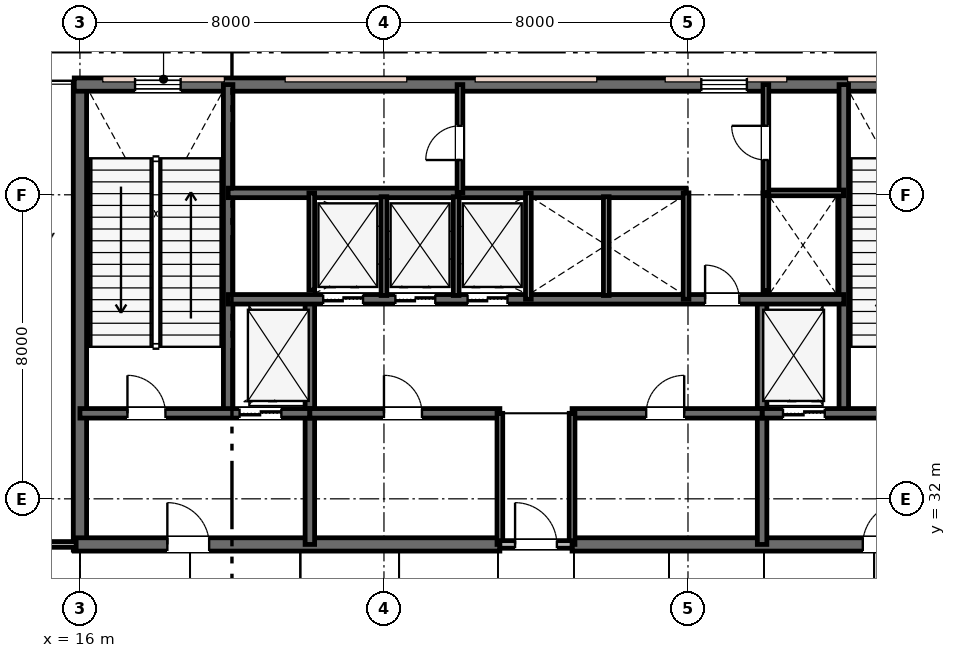
"""IFC4 building model, lengths in metres.
Left out: names, types, materials, properties, quantities, classifications, styles, units other than length and angle.
Written with IfcOpenShell. Run it as: python <this file> out.ifc"""

import sys

from ifc_helpers import new_model, si_unit, direction, frame, frame_2d, origin, place, context, subcontext, project, spatial, rectangle, extrude, element, fill, save


model = new_model("IFC4")
c1 = context("Model", 3, precision=1e-05, world=origin(), true_north=direction((0.0, 1.0)))
c2 = subcontext(c1, "Body", "Model", "MODEL_VIEW")
j1 = project(units=[si_unit("LENGTHUNIT", "METRE"), si_unit("PLANEANGLEUNIT", "RADIAN")], contexts=[c1])
p1 = place(None, origin())
s1 = spatial("IfcSite", under=j1, at=p1, CompositionType="ELEMENT")
p2 = place(p1, origin())
s2 = spatial("IfcBuilding", under=s1, at=p2, CompositionType="ELEMENT")
p3 = place(p2, frame((0.0, 0.0, 213.0)))
s3 = spatial("IfcBuildingStorey", under=s2, at=p3, CompositionType="ELEMENT", Elevation=213.0)
p4 = place(p3, frame((16.0, 30.65, 0.0), z_axis=(0.0, 0.0, 1.0), x_axis=(0.0, 1.0, 0.0)))
e1 = element("IfcWall", 1, at=p4, inside=s3, PredefinedType="SHEAR", context=c2, shape_type="SweptSolid", body=[
    extrude(rectangle(XDim=12.3, YDim=0.35, at=frame_2d((6.15, 0.0))), origin(), (0.0, 0.0, 1.0), 5.4),
])
p5 = place(p3, frame((15.85, 42.9, 0.0), z_axis=(0.0, 0.0, 1.0), x_axis=(1.0, 0.0, 0.0)))
e2 = element("IfcWall", 2, at=p5, inside=s3, PredefinedType="SHEAR", context=c2, shape_type="SweptSolid", body=[
    extrude(rectangle(XDim=24.3, YDim=0.35, at=frame_2d((12.15, 0.0))), origin(), (0.0, 0.0, 1.0), 5.4),
])
p6 = place(p5, frame((1.6, 0.0, 0.95)))
e3 = element("IfcOpeningElement", 3, at=p6, cuts=e2, PredefinedType="OPENING", context=c2, shape_type="SweptSolid", body=[
    extrude(rectangle(XDim=1.2, YDim=1.6, at=frame_2d((0.6, 0.8))), frame((0.0, 0.185, 0.0), z_axis=(0.0, -1.0, 0.0), x_axis=(1.0, 0.0, 0.0)), (0.0, 0.0, 1.0), 0.37),
])
p7 = place(p5, frame((16.5, 0.0, 0.95)))
e4 = element("IfcOpeningElement", 4, at=p7, cuts=e2, PredefinedType="OPENING", context=c2, shape_type="SweptSolid", body=[
    extrude(rectangle(XDim=1.2, YDim=1.6, at=frame_2d((0.6, 0.8))), frame((0.0, 0.185, 0.0), z_axis=(0.0, -1.0, 0.0), x_axis=(1.0, 0.0, 0.0)), (0.0, 0.0, 1.0), 0.37),
])
p8 = place(p5, frame((21.6, 0.0, 0.95)))
e5 = element("IfcOpeningElement", 5, at=p8, cuts=e2, PredefinedType="OPENING", context=c2, shape_type="SweptSolid", body=[
    extrude(rectangle(XDim=1.2, YDim=1.6, at=frame_2d((0.6, 0.8))), frame((0.0, 0.185, 0.0), z_axis=(0.0, -1.0, 0.0), x_axis=(1.0, 0.0, 0.0)), (0.0, 0.0, 1.0), 0.37),
])
p9 = place(p3, frame((15.85, 30.8, 0.0), z_axis=(0.0, 0.0, 1.0), x_axis=(1.0, 0.0, 0.0)))
e6 = element("IfcWall", 6, at=p9, inside=s3, PredefinedType="SHEAR", context=c2, shape_type="SweptSolid", body=[
    extrude(rectangle(XDim=11.2, YDim=0.35, at=frame_2d((5.6, 0.0))), origin(), (0.0, 0.0, 1.0), 5.4),
])
p10 = place(p9, frame((2.45, 0.0, 0.0)))
e7 = element("IfcOpeningElement", 7, at=p10, cuts=e6, PredefinedType="OPENING", context=c2, shape_type="SweptSolid", body=[
    extrude(rectangle(XDim=1.1, YDim=2.15, at=frame_2d((0.55, 1.075))), frame((0.0, 0.185, 0.0), z_axis=(0.0, -1.0, 0.0), x_axis=(1.0, 0.0, 0.0)), (0.0, 0.0, 1.0), 0.37),
])
p11 = place(p3, frame((28.95, 30.8, 0.0), z_axis=(0.0, 0.0, 1.0), x_axis=(1.0, 0.0, 0.0)))
e8 = element("IfcWall", 8, at=p11, inside=s3, PredefinedType="SHEAR", context=c2, shape_type="SweptSolid", body=[
    extrude(rectangle(XDim=11.2, YDim=0.35, at=frame_2d((5.6, 0.0))), origin(), (0.0, 0.0, 1.0), 5.4),
])
p12 = place(p11, frame((7.65, 0.0, 0.0)))
e9 = element("IfcOpeningElement", 9, at=p12, cuts=e8, PredefinedType="OPENING", context=c2, shape_type="SweptSolid", body=[
    extrude(rectangle(XDim=1.1, YDim=2.15, at=frame_2d((0.55, 1.075))), frame((0.0, 0.185, 0.0), z_axis=(0.0, -1.0, 0.0), x_axis=(1.0, 0.0, 0.0)), (0.0, 0.0, 1.0), 0.37),
])
for number, where, z_axis, x_axis in (
    (10, (19.9, 34.25, 0.0), (0.0, 0.0, 1.0), (0.0, 1.0, 0.0)),
    (11, (36.1, 34.25, 0.0), (0.0, 0.0, 1.0), (0.0, 1.0, 0.0)),
):
    element("IfcWall", number, at=place(p3, frame(where, z_axis=z_axis, x_axis=x_axis)), inside=s3, PredefinedType="SHEAR", context=c2, shape_type="SweptSolid", body=[
        extrude(rectangle(XDim=8.65, YDim=0.25, at=frame_2d((4.325, 0.0))), origin(), (0.0, 0.0, 1.0), 5.4),
    ])
for number, where, z_axis, x_axis in (
    (12, (22.05, 30.8, 0.0), (0.0, 0.0, 1.0), (0.0, 1.0, 0.0)),
    (13, (33.95, 30.8, 0.0), (0.0, 0.0, 1.0), (0.0, 1.0, 0.0)),
):
    element("IfcWall", number, at=place(p3, frame(where, z_axis=z_axis, x_axis=x_axis)), inside=s3, PredefinedType="SHEAR", context=c2, shape_type="SweptSolid", body=[
        extrude(rectangle(XDim=6.45, YDim=0.25, at=frame_2d((3.225, 0.0))), origin(), (0.0, 0.0, 1.0), 5.4),
    ])
p13 = place(p3, frame((16.0, 34.25, 0.0), z_axis=(0.0, 0.0, 1.0), x_axis=(1.0, 0.0, 0.0)))
e14 = element("IfcWall", 14, at=p13, inside=s3, PredefinedType="SHEAR", context=c2, shape_type="SweptSolid", body=[
    extrude(rectangle(XDim=6.05, YDim=0.25, at=frame_2d((3.025, 0.0))), origin(), (0.0, 0.0, 1.0), 5.4),
])
p14 = place(p13, frame((1.25, 0.0, 0.0)))
e15 = element("IfcOpeningElement", 15, at=p14, cuts=e14, PredefinedType="OPENING", context=c2, shape_type="SweptSolid", body=[
    extrude(rectangle(XDim=1.0, YDim=2.15, at=frame_2d((0.5, 1.075))), frame((0.0, 0.135, 0.0), z_axis=(0.0, -1.0, 0.0), x_axis=(1.0, 0.0, 0.0)), (0.0, 0.0, 1.0), 0.27),
])
p15 = place(p13, frame((4.2, 0.0, 0.0)))
e16 = element("IfcOpeningElement", 16, at=p15, cuts=e14, PredefinedType="OPENING", context=c2, shape_type="SweptSolid", body=[
    extrude(rectangle(XDim=1.1, YDim=2.15, at=frame_2d((0.55, 1.075))), frame((0.0, 0.135, 0.0), z_axis=(0.0, -1.0, 0.0), x_axis=(1.0, 0.0, 0.0)), (0.0, 0.0, 1.0), 0.27),
])
p16 = place(p3, frame((33.95, 34.25, 0.0), z_axis=(0.0, 0.0, 1.0), x_axis=(1.0, 0.0, 0.0)))
e17 = element("IfcWall", 17, at=p16, inside=s3, PredefinedType="SHEAR", context=c2, shape_type="SweptSolid", body=[
    extrude(rectangle(XDim=6.05, YDim=0.25, at=frame_2d((3.025, 0.0))), origin(), (0.0, 0.0, 1.0), 5.4),
])
p17 = place(p16, frame((3.7, 0.0, 0.0)))
e18 = element("IfcOpeningElement", 18, at=p17, cuts=e17, PredefinedType="OPENING", context=c2, shape_type="SweptSolid", body=[
    extrude(rectangle(XDim=1.0, YDim=2.15, at=frame_2d((0.5, 1.075))), frame((0.0, 0.135, 0.0), z_axis=(0.0, -1.0, 0.0), x_axis=(1.0, 0.0, 0.0)), (0.0, 0.0, 1.0), 0.27),
])
p18 = place(p16, frame((0.55, 0.0, 0.0)))
e19 = element("IfcOpeningElement", 19, at=p18, cuts=e17, PredefinedType="OPENING", context=c2, shape_type="SweptSolid", body=[
    extrude(rectangle(XDim=1.1, YDim=2.15, at=frame_2d((0.55, 1.075))), frame((0.0, 0.135, 0.0), z_axis=(0.0, -1.0, 0.0), x_axis=(1.0, 0.0, 0.0)), (0.0, 0.0, 1.0), 0.27),
])
p19 = place(p3, frame((22.05, 34.25, 0.0), z_axis=(0.0, 0.0, 1.0), x_axis=(1.0, 0.0, 0.0)))
e20 = element("IfcWall", 20, at=p19, inside=s3, PredefinedType="SHEAR", context=c2, shape_type="SweptSolid", body=[
    extrude(rectangle(XDim=5.0, YDim=0.25, at=frame_2d((2.5, 0.0))), origin(), (0.0, 0.0, 1.0), 5.4),
])
p20 = place(p19, frame((1.95, 0.0, 0.0)))
e21 = element("IfcOpeningElement", 21, at=p20, cuts=e20, PredefinedType="OPENING", context=c2, shape_type="SweptSolid", body=[
    extrude(rectangle(XDim=1.0, YDim=2.15, at=frame_2d((0.5, 1.075))), frame((0.0, 0.135, 0.0), z_axis=(0.0, -1.0, 0.0), x_axis=(1.0, 0.0, 0.0)), (0.0, 0.0, 1.0), 0.27),
])
p21 = place(p3, frame((28.95, 34.25, 0.0), z_axis=(0.0, 0.0, 1.0), x_axis=(1.0, 0.0, 0.0)))
e22 = element("IfcWall", 22, at=p21, inside=s3, PredefinedType="SHEAR", context=c2, shape_type="SweptSolid", body=[
    extrude(rectangle(XDim=5.0, YDim=0.25, at=frame_2d((2.5, 0.0))), origin(), (0.0, 0.0, 1.0), 5.4),
])
p22 = place(p21, frame((1.95, 0.0, 0.0)))
e23 = element("IfcOpeningElement", 23, at=p22, cuts=e22, PredefinedType="OPENING", context=c2, shape_type="SweptSolid", body=[
    extrude(rectangle(XDim=1.0, YDim=2.15, at=frame_2d((0.5, 1.075))), frame((0.0, 0.135, 0.0), z_axis=(0.0, -1.0, 0.0), x_axis=(1.0, 0.0, 0.0)), (0.0, 0.0, 1.0), 0.27),
])
p23 = place(p3, frame((19.9, 37.25, 0.0), z_axis=(0.0, 0.0, 1.0), x_axis=(1.0, 0.0, 0.0)))
e24 = element("IfcWall", 24, at=p23, inside=s3, PredefinedType="SHEAR", context=c2, shape_type="SweptSolid", body=[
    extrude(rectangle(XDim=16.2, YDim=0.25, at=frame_2d((8.1, 0.0))), origin(), (0.0, 0.0, 1.0), 5.4),
])
p24 = place(p23, frame((12.55, 0.0, 0.0)))
e25 = element("IfcOpeningElement", 25, at=p24, cuts=e24, PredefinedType="OPENING", context=c2, shape_type="SweptSolid", body=[
    extrude(rectangle(XDim=0.9, YDim=2.15, at=frame_2d((0.45, 1.075))), frame((0.0, 0.135, 0.0), z_axis=(0.0, -1.0, 0.0), x_axis=(1.0, 0.0, 0.0)), (0.0, 0.0, 1.0), 0.27),
])
p25 = place(p23, frame((2.5, 0.0, 0.0)))
e26 = element("IfcOpeningElement", 26, at=p25, cuts=e24, PredefinedType="OPENING", context=c2, shape_type="SweptSolid", body=[
    extrude(rectangle(XDim=1.05, YDim=2.15, at=frame_2d((0.525, 1.075))), frame((0.0, 0.135, 0.0), z_axis=(0.0, -1.0, 0.0), x_axis=(1.0, 0.0, 0.0)), (0.0, 0.0, 1.0), 0.27),
])
p26 = place(p23, frame((4.4, 0.0, 0.0)))
e27 = element("IfcOpeningElement", 27, at=p26, cuts=e24, PredefinedType="OPENING", context=c2, shape_type="SweptSolid", body=[
    extrude(rectangle(XDim=1.05, YDim=2.15, at=frame_2d((0.525, 1.075))), frame((0.0, 0.135, 0.0), z_axis=(0.0, -1.0, 0.0), x_axis=(1.0, 0.0, 0.0)), (0.0, 0.0, 1.0), 0.27),
])
p27 = place(p23, frame((6.3, 0.0, 0.0)))
e28 = element("IfcOpeningElement", 28, at=p27, cuts=e24, PredefinedType="OPENING", context=c2, shape_type="SweptSolid", body=[
    extrude(rectangle(XDim=1.05, YDim=2.15, at=frame_2d((0.525, 1.075))), frame((0.0, 0.135, 0.0), z_axis=(0.0, -1.0, 0.0), x_axis=(1.0, 0.0, 0.0)), (0.0, 0.0, 1.0), 0.27),
])
p28 = place(p3, frame((19.9, 40.05, 0.0), z_axis=(0.0, 0.0, 1.0), x_axis=(1.0, 0.0, 0.0)))
e29 = element("IfcWall", 29, at=p28, inside=s3, PredefinedType="SHEAR", context=c2, shape_type="SweptSolid", body=[
    extrude(rectangle(XDim=12.05, YDim=0.25, at=frame_2d((6.025, 0.0))), origin(), (0.0, 0.0, 1.0), 5.4),
])
for number, where, z_axis, x_axis in (
    (30, (27.05, 30.8, 0.0), (0.0, 0.0, 1.0), (0.0, 1.0, 0.0)),
    (31, (28.95, 30.8, 0.0), (0.0, 0.0, 1.0), (0.0, 1.0, 0.0)),
):
    element("IfcWall", number, at=place(p3, frame(where, z_axis=z_axis, x_axis=x_axis)), inside=s3, PredefinedType="PLUMBINGWALL", context=c2, shape_type="SweptSolid", body=[
        extrude(rectangle(XDim=3.45, YDim=0.15, at=frame_2d((1.725, 0.0))), origin(), (0.0, 0.0, 1.0), 4.82),
    ])
p29 = place(p3, frame((27.05, 30.8, 0.0), z_axis=(0.0, 0.0, 1.0), x_axis=(1.0, 0.0, 0.0)))
e32 = element("IfcWall", 32, at=p29, inside=s3, PredefinedType="PARTITIONING", context=c2, shape_type="SweptSolid", body=[
    extrude(rectangle(XDim=1.9, YDim=0.2, at=frame_2d((0.95, 0.0))), origin(), (0.0, 0.0, 1.0), 4.82),
])
p30 = place(p29, frame((0.4, 0.0, 0.0)))
e33 = element("IfcOpeningElement", 33, at=p30, cuts=e32, PredefinedType="OPENING", context=c2, shape_type="SweptSolid", body=[
    extrude(rectangle(XDim=1.1, YDim=2.15, at=frame_2d((0.55, 1.075))), frame((0.0, 0.11, 0.0), z_axis=(0.0, -1.0, 0.0), x_axis=(1.0, 0.0, 0.0)), (0.0, 0.0, 1.0), 0.22),
])
p31 = place(p3, frame((22.1, 37.49, 0.0), z_axis=(0.0, 0.0, 1.0), x_axis=(0.0, 1.0, 0.0)))
e34 = element("IfcWall", 34, at=p31, inside=s3, PredefinedType="PLUMBINGWALL", context=c2, shape_type="SweptSolid", body=[
    extrude(rectangle(XDim=2.56, YDim=0.15, at=frame_2d((1.28, 0.0))), origin(), (0.0, 0.0, 1.0), 5.13),
])
p32 = place(p3, frame((27.8, 37.25, 0.0), z_axis=(0.0, 0.0, 1.0), x_axis=(0.0, 1.0, 0.0)))
e35 = element("IfcWall", 35, at=p32, inside=s3, PredefinedType="PLUMBINGWALL", context=c2, shape_type="SweptSolid", body=[
    extrude(rectangle(XDim=2.8, YDim=0.15, at=frame_2d((1.4, 0.0))), origin(), (0.0, 0.0, 1.0), 5.13),
])
for number, where, z_axis, x_axis in (
    (36, (24.0, 37.35, 0.0), (0.0, 0.0, 1.0), (0.0, 1.0, 0.0)),
    (37, (25.9, 37.35, 0.0), (0.0, 0.0, 1.0), (0.0, 1.0, 0.0)),
):
    element("IfcWall", number, at=place(p3, frame(where, z_axis=z_axis, x_axis=x_axis)), inside=s3, PredefinedType="PLUMBINGWALL", context=c2, shape_type="SweptSolid", body=[
        extrude(rectangle(XDim=2.6, YDim=0.15, at=frame_2d((1.3, 0.0))), origin(), (0.0, 0.0, 1.0), 5.13),
    ])
p33 = place(p3, frame((31.95, 37.25, 0.0), z_axis=(0.0, 0.0, 1.0), x_axis=(0.0, 1.0, 0.0)))
e38 = element("IfcWall", 38, at=p33, inside=s3, PredefinedType="PLUMBINGWALL", context=c2, shape_type="SweptSolid", body=[
    extrude(rectangle(XDim=2.8, YDim=0.15, at=frame_2d((1.4, 0.0))), origin(), (0.0, 0.0, 1.0), 5.13),
])
p34 = place(p3, frame((29.85, 37.35, 0.0), z_axis=(0.0, 0.0, 1.0), x_axis=(0.0, 1.0, 0.0)))
e39 = element("IfcWall", 39, at=p34, inside=s3, PredefinedType="PLUMBINGWALL", context=c2, shape_type="SweptSolid", body=[
    extrude(rectangle(XDim=2.6, YDim=0.15, at=frame_2d((1.3, 0.0))), origin(), (0.0, 0.0, 1.0), 5.13),
])
p35 = place(p3, frame((34.05, 37.473, 0.0), z_axis=(0.0, 0.0, 1.0), x_axis=(0.0, 1.0, 0.0)))
e40 = element("IfcWall", 40, at=p35, inside=s3, PredefinedType="PLUMBINGWALL", context=c2, shape_type="SweptSolid", body=[
    extrude(rectangle(XDim=2.577, YDim=0.15, at=frame_2d((1.288, 0.0))), origin(), (0.0, 0.0, 1.0), 5.13),
])
p36 = place(p3, frame((34.05, 40.05, 0.0), z_axis=(0.0, 0.0, 1.0), x_axis=(1.0, 0.0, 0.0)))
e41 = element("IfcWall", 41, at=p36, inside=s3, PredefinedType="PARTITIONING", context=c2, shape_type="SweptSolid", body=[
    extrude(rectangle(XDim=2.05, YDim=0.15, at=frame_2d((1.025, 0.0))), origin(), (0.0, 0.0, 1.0), 5.13),
])
p37 = place(p3, frame((34.05, 40.05, 0.0), z_axis=(0.0, 0.0, 1.0), x_axis=(0.0, 1.0, 0.0)))
e42 = element("IfcWall", 42, at=p37, inside=s3, PredefinedType="PARTITIONING", context=c2, shape_type="SweptSolid", body=[
    extrude(rectangle(XDim=2.85, YDim=0.15, at=frame_2d((1.425, 0.0))), origin(), (0.0, 0.0, 1.0), 5.13),
])
p38 = place(p37, frame((0.865, 0.0, 0.0)))
e43 = element("IfcOpeningElement", 43, at=p38, cuts=e42, PredefinedType="OPENING", context=c2, shape_type="SweptSolid", body=[
    extrude(rectangle(XDim=0.9, YDim=2.15, at=frame_2d((0.45, 1.075))), frame((0.0, 0.085, 0.0), z_axis=(0.0, -1.0, 0.0), x_axis=(1.0, 0.0, 0.0)), (0.0, 0.0, 1.0), 0.17),
])
p39 = place(p3, frame((26.0, 40.05, 0.0), z_axis=(0.0, 0.0, 1.0), x_axis=(0.0, 1.0, 0.0)))
e44 = element("IfcWall", 44, at=p39, inside=s3, PredefinedType="PARTITIONING", context=c2, shape_type="SweptSolid", body=[
    extrude(rectangle(XDim=2.85, YDim=0.15, at=frame_2d((1.425, 0.0))), origin(), (0.0, 0.0, 1.0), 5.13),
])
p40 = place(p39, frame((0.865, 0.0, 0.0)))
e45 = element("IfcOpeningElement", 45, at=p40, cuts=e44, PredefinedType="OPENING", context=c2, shape_type="SweptSolid", body=[
    extrude(rectangle(XDim=0.9, YDim=2.15, at=frame_2d((0.45, 1.075))), frame((0.0, 0.085, 0.0), z_axis=(0.0, -1.0, 0.0), x_axis=(1.0, 0.0, 0.0)), (0.0, 0.0, 1.0), 0.17),
])
p41 = place(p3, frame((5.1, 30.8, 0.0), z_axis=(0.0, 0.0, 1.0), x_axis=(1.0, 0.0, 0.0)))
e46 = element("IfcWall", 46, at=p41, inside=s3, PredefinedType="PARTITIONING", context=c2, shape_type="SweptSolid", body=[
    extrude(rectangle(XDim=10.8, YDim=0.15, at=frame_2d((5.4, 0.0))), origin(), (0.0, 0.0, 1.0), 4.52),
])
p42 = place(p41, frame((1.455, 0.0, 0.0)))
e47 = element("IfcOpeningElement", 47, at=p42, cuts=e46, PredefinedType="OPENING", context=c2, shape_type="SweptSolid", body=[
    extrude(rectangle(XDim=0.95, YDim=2.15, at=frame_2d((0.475, 1.075))), frame((0.0, 0.085, 0.0), z_axis=(0.0, -1.0, 0.0), x_axis=(1.0, 0.0, 0.0)), (0.0, 0.0, 1.0), 0.17),
])
p43 = place(p41, frame((7.625, 0.0, 0.0)))
e48 = element("IfcOpeningElement", 48, at=p43, cuts=e46, PredefinedType="OPENING", context=c2, shape_type="SweptSolid", body=[
    extrude(rectangle(XDim=0.95, YDim=2.15, at=frame_2d((0.475, 1.075))), frame((0.0, 0.085, 0.0), z_axis=(0.0, -1.0, 0.0), x_axis=(1.0, 0.0, 0.0)), (0.0, 0.0, 1.0), 0.17),
])
p44 = place(p6, origin())
e49 = element("IfcWindow", 49, at=p44, inside=s3, PartitioningType="SINGLE_PANEL", PredefinedType="WINDOW", context=c2, shape_type="SweptSolid", body=[
    extrude(rectangle(XDim=1.2, YDim=1.6, at=frame_2d((0.6, 0.8))), frame((0.0, 0.03, 0.0), z_axis=(0.0, -1.0, 0.0), x_axis=(1.0, 0.0, 0.0)), (0.0, 0.0, 1.0), 0.06),
])
fill(e3, e49)
p45 = place(p7, origin())
e50 = element("IfcWindow", 50, at=p45, inside=s3, PartitioningType="SINGLE_PANEL", PredefinedType="WINDOW", context=c2, shape_type="SweptSolid", body=[
    extrude(rectangle(XDim=1.2, YDim=1.6, at=frame_2d((0.6, 0.8))), frame((0.0, 0.03, 0.0), z_axis=(0.0, -1.0, 0.0), x_axis=(1.0, 0.0, 0.0)), (0.0, 0.0, 1.0), 0.06),
])
fill(e4, e50)
p46 = place(p30, origin())
e51 = element("IfcDoor", 51, at=p46, inside=s3, OperationType="SINGLE_SWING_LEFT", PredefinedType="DOOR", context=c2, shape_type="SweptSolid", body=[
    extrude(rectangle(XDim=1.1, YDim=2.15, at=frame_2d((0.55, 1.075))), frame((0.0, 0.025, 0.0), z_axis=(0.0, -1.0, 0.0), x_axis=(1.0, 0.0, 0.0)), (0.0, 0.0, 1.0), 0.05),
])
fill(e33, e51)
p47 = place(p14, origin())
e52 = element("IfcDoor", 52, at=p47, inside=s3, OperationType="SINGLE_SWING_LEFT", PredefinedType="DOOR", context=c2, shape_type="SweptSolid", body=[
    extrude(rectangle(XDim=1.0, YDim=2.15, at=frame_2d((0.5, 1.075))), frame((0.0, 0.025, 0.0), z_axis=(0.0, -1.0, 0.0), x_axis=(1.0, 0.0, 0.0)), (0.0, 0.0, 1.0), 0.05),
])
fill(e15, e52)
p48 = place(p10, origin())
e53 = element("IfcDoor", 53, at=p48, inside=s3, OperationType="SINGLE_SWING_LEFT", PredefinedType="DOOR", context=c2, shape_type="SweptSolid", body=[
    extrude(rectangle(XDim=1.1, YDim=2.15, at=frame_2d((0.55, 1.075))), frame((0.0, 0.025, 0.0), z_axis=(0.0, -1.0, 0.0), x_axis=(1.0, 0.0, 0.0)), (0.0, 0.0, 1.0), 0.05),
])
fill(e7, e53)
p49 = place(p12, origin())
e54 = element("IfcDoor", 54, at=p49, inside=s3, OperationType="SINGLE_SWING_RIGHT", PredefinedType="DOOR", context=c2, shape_type="SweptSolid", body=[
    extrude(rectangle(XDim=1.1, YDim=2.15, at=frame_2d((0.55, 1.075))), frame((0.0, 0.025, 0.0), z_axis=(0.0, -1.0, 0.0), x_axis=(1.0, 0.0, 0.0)), (0.0, 0.0, 1.0), 0.05),
])
fill(e9, e54)
p50 = place(p20, origin())
e55 = element("IfcDoor", 55, at=p50, inside=s3, OperationType="SINGLE_SWING_LEFT", PredefinedType="DOOR", context=c2, shape_type="SweptSolid", body=[
    extrude(rectangle(XDim=1.0, YDim=2.15, at=frame_2d((0.5, 1.075))), frame((0.0, 0.025, 0.0), z_axis=(0.0, -1.0, 0.0), x_axis=(1.0, 0.0, 0.0)), (0.0, 0.0, 1.0), 0.05),
])
fill(e21, e55)
p51 = place(p22, origin())
e56 = element("IfcDoor", 56, at=p51, inside=s3, OperationType="SINGLE_SWING_RIGHT", PredefinedType="DOOR", context=c2, shape_type="SweptSolid", body=[
    extrude(rectangle(XDim=1.0, YDim=2.15, at=frame_2d((0.5, 1.075))), frame((0.0, 0.025, 0.0), z_axis=(0.0, -1.0, 0.0), x_axis=(1.0, 0.0, 0.0)), (0.0, 0.0, 1.0), 0.05),
])
fill(e23, e56)
p52 = place(p24, origin())
e57 = element("IfcDoor", 57, at=p52, inside=s3, OperationType="SINGLE_SWING_LEFT", PredefinedType="DOOR", context=c2, shape_type="SweptSolid", body=[
    extrude(rectangle(XDim=0.9, YDim=2.15, at=frame_2d((0.45, 1.075))), frame((0.0, 0.025, 0.0), z_axis=(0.0, -1.0, 0.0), x_axis=(1.0, 0.0, 0.0)), (0.0, 0.0, 1.0), 0.05),
])
fill(e25, e57)
p53 = place(p38, origin())
e58 = element("IfcDoor", 58, at=p53, inside=s3, OperationType="SINGLE_SWING_RIGHT", PredefinedType="DOOR", context=c2, shape_type="SweptSolid", body=[
    extrude(rectangle(XDim=0.9, YDim=2.15, at=frame_2d((0.45, 1.075))), frame((0.0, 0.025, 0.0), z_axis=(0.0, -1.0, 0.0), x_axis=(1.0, 0.0, 0.0)), (0.0, 0.0, 1.0), 0.05),
])
fill(e43, e58)
p54 = place(p40, origin())
e59 = element("IfcDoor", 59, at=p54, inside=s3, OperationType="SINGLE_SWING_LEFT", PredefinedType="DOOR", context=c2, shape_type="SweptSolid", body=[
    extrude(rectangle(XDim=0.9, YDim=2.15, at=frame_2d((0.45, 1.075))), frame((0.0, 0.025, 0.0), z_axis=(0.0, -1.0, 0.0), x_axis=(1.0, 0.0, 0.0)), (0.0, 0.0, 1.0), 0.05),
])
fill(e45, e59)
p55 = place(p15, origin())
e60 = element("IfcDoor", 60, at=p55, inside=s3, OperationType="DOUBLE_DOOR_SLIDING", PredefinedType="DOOR", context=c2, shape_type="SweptSolid", body=[
    extrude(rectangle(XDim=1.1, YDim=2.15, at=frame_2d((0.55, 1.075))), frame((0.0, 0.025, 0.0), z_axis=(0.0, -1.0, 0.0), x_axis=(1.0, 0.0, 0.0)), (0.0, 0.0, 1.0), 0.05),
])
fill(e16, e60)
p56 = place(p18, origin())
e61 = element("IfcDoor", 61, at=p56, inside=s3, OperationType="DOUBLE_DOOR_SLIDING", PredefinedType="DOOR", context=c2, shape_type="SweptSolid", body=[
    extrude(rectangle(XDim=1.1, YDim=2.15, at=frame_2d((0.55, 1.075))), frame((0.0, 0.025, 0.0), z_axis=(0.0, -1.0, 0.0), x_axis=(1.0, 0.0, 0.0)), (0.0, 0.0, 1.0), 0.05),
])
fill(e19, e61)
p57 = place(p25, origin())
e62 = element("IfcDoor", 62, at=p57, inside=s3, OperationType="DOUBLE_DOOR_SLIDING", PredefinedType="DOOR", context=c2, shape_type="SweptSolid", body=[
    extrude(rectangle(XDim=1.05, YDim=2.15, at=frame_2d((0.525, 1.075))), frame((0.0, 0.025, 0.0), z_axis=(0.0, -1.0, 0.0), x_axis=(1.0, 0.0, 0.0)), (0.0, 0.0, 1.0), 0.05),
])
fill(e26, e62)
p58 = place(p26, origin())
e63 = element("IfcDoor", 63, at=p58, inside=s3, OperationType="DOUBLE_DOOR_SLIDING", PredefinedType="DOOR", context=c2, shape_type="SweptSolid", body=[
    extrude(rectangle(XDim=1.05, YDim=2.15, at=frame_2d((0.525, 1.075))), frame((0.0, 0.025, 0.0), z_axis=(0.0, -1.0, 0.0), x_axis=(1.0, 0.0, 0.0)), (0.0, 0.0, 1.0), 0.05),
])
fill(e27, e63)
p59 = place(p27, origin())
e64 = element("IfcDoor", 64, at=p59, inside=s3, OperationType="DOUBLE_DOOR_SLIDING", PredefinedType="DOOR", context=c2, shape_type="SweptSolid", body=[
    extrude(rectangle(XDim=1.05, YDim=2.15, at=frame_2d((0.525, 1.075))), frame((0.0, 0.025, 0.0), z_axis=(0.0, -1.0, 0.0), x_axis=(1.0, 0.0, 0.0)), (0.0, 0.0, 1.0), 0.05),
])
fill(e28, e64)
save(model, sys.argv[1])
